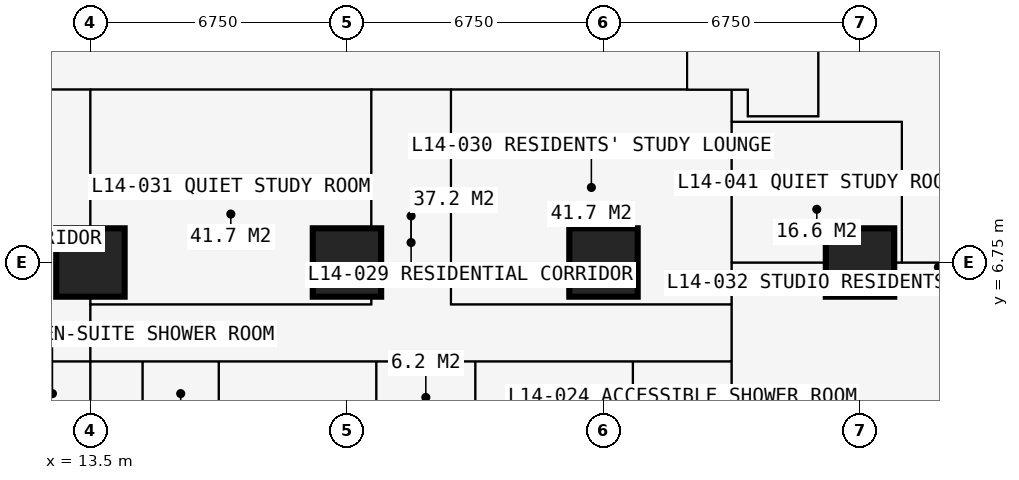
"""IFC4 building model, lengths in metres.
Left out: names, types, materials, properties, quantities, classifications, styles, units other than length and angle.
Written with IfcOpenShell. Run it as: python <this file> out.ifc"""

import sys

from ifc_helpers import new_model, si_unit, direction, frame, frame_2d, origin, origin_2d, place, context, subcontext, project, spatial, rectangle, extrude, element, fill, save


model = new_model("IFC4")
c1 = context("Model", 3, precision=1e-05, world=origin(), true_north=direction((0.0, 1.0)))
c2 = subcontext(c1, "Body", "Model", "MODEL_VIEW")
j1 = project(units=[si_unit("LENGTHUNIT", "METRE"), si_unit("PLANEANGLEUNIT", "RADIAN")], contexts=[c1])
p1 = place(None, origin())
s1 = spatial("IfcSite", under=j1, at=p1, CompositionType="ELEMENT")
p2 = place(p1, origin())
s2 = spatial("IfcBuilding", under=s1, at=p2, CompositionType="ELEMENT")
p3 = place(p2, frame((0.0, 0.0, 54.0)))
s3 = spatial("IfcBuildingStorey", under=s2, at=p3, CompositionType="ELEMENT", Elevation=54.0)
for number, where, z_axis, x_axis in (
    (1, (13.5, 6.75, 0.0), (0.0, 0.0, 1.0), (1.0, 0.0, 0.0)),
    (2, (20.25, 6.75, 0.0), (0.0, 0.0, 1.0), (1.0, 0.0, 0.0)),
    (3, (27.0, 6.75, 0.0), (0.0, 0.0, 1.0), (1.0, 0.0, 0.0)),
    (4, (33.75, 6.75, 0.0), (0.0, 0.0, 1.0), (1.0, 0.0, 0.0)),
):
    element("IfcColumn", number, at=place(p3, frame(where, z_axis=z_axis, x_axis=x_axis)), inside=s3, PredefinedType="COLUMN", context=c2, shape_type="SweptSolid", body=[
        extrude(rectangle(XDim=1.8, YDim=1.8, at=origin_2d()), origin(), (0.0, 0.0, 1.0), 3.6),
    ])
p4 = place(p3, frame((6.75, 4.15, 0.0), z_axis=(0.0, 0.0, 1.0), x_axis=(1.0, 0.0, 0.0)))
e5 = element("IfcWall", 5, at=p4, inside=s3, PredefinedType="PARTITIONING", context=c2, shape_type="SweptSolid", body=[
    extrude(rectangle(XDim=23.625, YDim=0.15, at=frame_2d((11.812, 0.0))), origin(), (0.0, 0.0, 1.0), 3.375),
])
p5 = place(p4, frame((0.2, 0.0, 0.0)))
e6 = element("IfcOpeningElement", 6, at=p5, cuts=e5, PredefinedType="OPENING", context=c2, shape_type="SweptSolid", body=[
    extrude(rectangle(XDim=0.95, YDim=2.2, at=frame_2d((0.475, 1.1))), frame((0.0, 0.085, 0.0), z_axis=(0.0, -1.0, 0.0), x_axis=(1.0, 0.0, 0.0)), (0.0, 0.0, 1.0), 0.17),
])
p6 = place(p4, frame((3.625, 0.0, 0.0)))
e7 = element("IfcOpeningElement", 7, at=p6, cuts=e5, PredefinedType="OPENING", context=c2, shape_type="SweptSolid", body=[
    extrude(rectangle(XDim=0.95, YDim=2.2, at=frame_2d((0.475, 1.1))), frame((0.0, 0.085, 0.0), z_axis=(0.0, -1.0, 0.0), x_axis=(1.0, 0.0, 0.0)), (0.0, 0.0, 1.0), 0.17),
])
p7 = place(p4, frame((18.475, 0.0, 0.0)))
e8 = element("IfcOpeningElement", 8, at=p7, cuts=e5, PredefinedType="OPENING", context=c2, shape_type="SweptSolid", body=[
    extrude(rectangle(XDim=0.95, YDim=2.2, at=frame_2d((0.475, 1.1))), frame((0.0, 0.085, 0.0), z_axis=(0.0, -1.0, 0.0), x_axis=(1.0, 0.0, 0.0)), (0.0, 0.0, 1.0), 0.17),
])
p8 = place(p4, frame((11.725, 0.0, 0.0)))
e9 = element("IfcOpeningElement", 9, at=p8, cuts=e5, PredefinedType="OPENING", context=c2, shape_type="SweptSolid", body=[
    extrude(rectangle(XDim=0.95, YDim=2.2, at=frame_2d((0.475, 1.1))), frame((0.0, 0.085, 0.0), z_axis=(0.0, -1.0, 0.0), x_axis=(1.0, 0.0, 0.0)), (0.0, 0.0, 1.0), 0.17),
])
p9 = place(p4, frame((6.95, 0.0, 0.0)))
e10 = element("IfcOpeningElement", 10, at=p9, cuts=e5, PredefinedType="OPENING", context=c2, shape_type="SweptSolid", body=[
    extrude(rectangle(XDim=0.95, YDim=2.2, at=frame_2d((0.475, 1.1))), frame((0.0, 0.085, 0.0), z_axis=(0.0, -1.0, 0.0), x_axis=(1.0, 0.0, 0.0)), (0.0, 0.0, 1.0), 0.17),
])
p10 = place(p3, frame((10.125, 11.3, 0.0), z_axis=(0.0, 0.0, 1.0), x_axis=(1.0, 0.0, 0.0)))
e11 = element("IfcWall", 11, at=p10, inside=s3, PredefinedType="PARTITIONING", context=c2, shape_type="SweptSolid", body=[
    extrude(rectangle(XDim=20.675, YDim=0.15, at=frame_2d((10.337, 0.0))), origin(), (0.0, 0.0, 1.0), 3.375),
])
p11 = place(p10, frame((1.775, 0.0, 0.0)))
e12 = element("IfcOpeningElement", 12, at=p11, cuts=e11, PredefinedType="OPENING", context=c2, shape_type="SweptSolid", body=[
    extrude(rectangle(XDim=1.0, YDim=2.2, at=frame_2d((0.5, 1.1))), frame((0.0, 0.085, 0.0), z_axis=(0.0, -1.0, 0.0), x_axis=(1.0, 0.0, 0.0)), (0.0, 0.0, 1.0), 0.17),
])
p12 = place(p10, frame((11.312, 0.0, 0.0)))
e13 = element("IfcOpeningElement", 13, at=p12, cuts=e11, PredefinedType="OPENING", context=c2, shape_type="SweptSolid", body=[
    extrude(rectangle(XDim=1.0, YDim=2.2, at=frame_2d((0.5, 1.1))), frame((0.0, 0.085, 0.0), z_axis=(0.0, -1.0, 0.0), x_axis=(1.0, 0.0, 0.0)), (0.0, 0.0, 1.0), 0.17),
])
p13 = place(p3, frame((13.5, -0.734, 0.0), z_axis=(0.0, 0.0, 1.0), x_axis=(0.0, 1.0, 0.0)))
e14 = element("IfcWall", 14, at=p13, inside=s3, PredefinedType="PARTITIONING", context=c2, shape_type="SweptSolid", body=[
    extrude(rectangle(XDim=12.034, YDim=0.15, at=frame_2d((6.017, 0.0))), origin(), (0.0, 0.0, 1.0), 2.877),
])
p14 = place(p3, frame((13.5, 5.65, 0.0), z_axis=(0.0, 0.0, 1.0), x_axis=(1.0, 0.0, 0.0)))
e15 = element("IfcWall", 15, at=p14, inside=s3, PredefinedType="PARTITIONING", context=c2, shape_type="SweptSolid", body=[
    extrude(rectangle(XDim=7.387, YDim=0.15, at=frame_2d((3.694, 0.0))), origin(), (0.0, 0.0, 1.0), 3.375),
])
p15 = place(p14, frame((3.2, 0.0, 0.0)))
e16 = element("IfcOpeningElement", 16, at=p15, cuts=e15, PredefinedType="OPENING", context=c2, shape_type="SweptSolid", body=[
    extrude(rectangle(XDim=0.95, YDim=2.2, at=frame_2d((0.475, 1.1))), frame((0.0, 0.085, 0.0), z_axis=(0.0, -1.0, 0.0), x_axis=(1.0, 0.0, 0.0)), (0.0, 0.0, 1.0), 0.17),
])
p16 = place(p3, frame((14.875, 1.95, 0.0), z_axis=(0.0, 0.0, 1.0), x_axis=(0.0, 1.0, 0.0)))
e17 = element("IfcWall", 17, at=p16, inside=s3, PredefinedType="PARTITIONING", context=c2, shape_type="SweptSolid", body=[
    extrude(rectangle(XDim=2.2, YDim=0.1, at=frame_2d((1.1, 0.0))), origin(), (0.0, 0.0, 1.0), 3.375),
])
p17 = place(p3, frame((16.875, -0.734, 0.0), z_axis=(0.0, 0.0, 1.0), x_axis=(0.0, 1.0, 0.0)))
e18 = element("IfcWall", 18, at=p17, inside=s3, PredefinedType="PARTITIONING", context=c2, shape_type="SweptSolid", body=[
    extrude(rectangle(XDim=4.884, YDim=0.175, at=frame_2d((2.442, 0.0))), origin(), (0.0, 0.0, 1.0), 3.375),
])
p18 = place(p17, frame((3.334, 0.0, 0.0)))
e19 = element("IfcOpeningElement", 19, at=p18, cuts=e18, PredefinedType="OPENING", context=c2, shape_type="SweptSolid", body=[
    extrude(rectangle(XDim=0.9, YDim=2.2, at=frame_2d((0.45, 1.1))), frame((0.0, 0.097, 0.0), z_axis=(0.0, -1.0, 0.0), x_axis=(1.0, 0.0, 0.0)), (0.0, 0.0, 1.0), 0.195),
])
p19 = place(p3, frame((20.887, 5.65, 0.0), z_axis=(0.0, 0.0, 1.0), x_axis=(0.0, 1.0, 0.0)))
e20 = element("IfcWall", 20, at=p19, inside=s3, PredefinedType="PARTITIONING", context=c2, shape_type="SweptSolid", body=[
    extrude(rectangle(XDim=5.65, YDim=0.15, at=frame_2d((2.825, 0.0))), origin(), (0.0, 0.0, 1.0), 3.375),
])
p20 = place(p3, frame((21.025, 1.75, 0.0), z_axis=(0.0, 0.0, 1.0), x_axis=(0.0, 1.0, 0.0)))
e21 = element("IfcWall", 21, at=p20, inside=s3, PredefinedType="PARTITIONING", context=c2, shape_type="SweptSolid", body=[
    extrude(rectangle(XDim=2.4, YDim=0.1, at=frame_2d((1.2, 0.0))), origin(), (0.0, 0.0, 1.0), 3.375),
])
p21 = place(p3, frame((22.988, 5.65, 0.0), z_axis=(0.0, 0.0, 1.0), x_axis=(1.0, 0.0, 0.0)))
e22 = element("IfcWall", 22, at=p21, inside=s3, PredefinedType="PARTITIONING", context=c2, shape_type="SweptSolid", body=[
    extrude(rectangle(XDim=7.387, YDim=0.15, at=frame_2d((3.694, 0.0))), origin(), (0.0, 0.0, 1.0), 3.375),
])
p22 = place(p21, frame((2.15, 0.0, 0.0)))
e23 = element("IfcOpeningElement", 23, at=p22, cuts=e22, PredefinedType="OPENING", context=c2, shape_type="SweptSolid", body=[
    extrude(rectangle(XDim=0.95, YDim=2.2, at=frame_2d((0.475, 1.1))), frame((0.0, 0.085, 0.0), z_axis=(0.0, -1.0, 0.0), x_axis=(1.0, 0.0, 0.0)), (0.0, 0.0, 1.0), 0.17),
])
p23 = place(p3, frame((22.988, 5.65, 0.0), z_axis=(0.0, 0.0, 1.0), x_axis=(0.0, 1.0, 0.0)))
e24 = element("IfcWall", 24, at=p23, inside=s3, PredefinedType="PARTITIONING", context=c2, shape_type="SweptSolid", body=[
    extrude(rectangle(XDim=5.65, YDim=0.15, at=frame_2d((2.825, 0.0))), origin(), (0.0, 0.0, 1.0), 3.375),
])
p24 = place(p3, frame((23.625, -0.734, 0.0), z_axis=(0.0, 0.0, 1.0), x_axis=(0.0, 1.0, 0.0)))
e25 = element("IfcWall", 25, at=p24, inside=s3, PredefinedType="PARTITIONING", context=c2, shape_type="SweptSolid", body=[
    extrude(rectangle(XDim=4.884, YDim=0.175, at=frame_2d((2.442, 0.0))), origin(), (0.0, 0.0, 1.0), 3.375),
])
p25 = place(p24, frame((3.234, 0.0, 0.0)))
e26 = element("IfcOpeningElement", 26, at=p25, cuts=e25, PredefinedType="OPENING", context=c2, shape_type="SweptSolid", body=[
    extrude(rectangle(XDim=0.9, YDim=2.2, at=frame_2d((0.45, 1.1))), frame((0.0, 0.097, 0.0), z_axis=(0.0, -1.0, 0.0), x_axis=(1.0, 0.0, 0.0)), (0.0, 0.0, 1.0), 0.195),
])
p26 = place(p3, frame((27.775, 1.75, 0.0), z_axis=(0.0, 0.0, 1.0), x_axis=(0.0, 1.0, 0.0)))
e27 = element("IfcWall", 27, at=p26, inside=s3, PredefinedType="PARTITIONING", context=c2, shape_type="SweptSolid", body=[
    extrude(rectangle(XDim=2.4, YDim=0.1, at=frame_2d((1.2, 0.0))), origin(), (0.0, 0.0, 1.0), 3.375),
])
p27 = place(p3, frame((29.2, 11.3, 0.0), z_axis=(0.0, 0.0, 1.0), x_axis=(0.0, 1.0, 0.0)))
e28 = element("IfcWall", 28, at=p27, inside=s3, PredefinedType="PARTITIONING", context=c2, shape_type="SweptSolid", body=[
    extrude(rectangle(XDim=17.9, YDim=0.2, at=frame_2d((8.95, 0.0))), origin(), (0.0, 0.0, 1.0), 3.375),
])
p28 = place(p27, frame((8.35, 0.0, 0.0)))
e29 = element("IfcOpeningElement", 29, at=p28, cuts=e28, PredefinedType="OPENING", context=c2, shape_type="SweptSolid", body=[
    extrude(rectangle(XDim=1.2, YDim=2.2, at=frame_2d((0.6, 1.1))), frame((0.0, 0.11, 0.0), z_axis=(0.0, -1.0, 0.0), x_axis=(1.0, 0.0, 0.0)), (0.0, 0.0, 1.0), 0.22),
])
p29 = place(p3, frame((30.375, -0.734, 0.0), z_axis=(0.0, 0.0, 1.0), x_axis=(0.0, 1.0, 0.0)))
e30 = element("IfcWall", 30, at=p29, inside=s3, PredefinedType="PARTITIONING", context=c2, shape_type="SweptSolid", body=[
    extrude(rectangle(XDim=12.034, YDim=0.15, at=frame_2d((6.017, 0.0))), origin(), (0.0, 0.0, 1.0), 3.375),
])
p30 = place(p29, frame((5.134, 0.0, 0.0)))
e31 = element("IfcOpeningElement", 31, at=p30, cuts=e30, PredefinedType="OPENING", context=c2, shape_type="SweptSolid", body=[
    extrude(rectangle(XDim=1.0, YDim=2.2, at=frame_2d((0.5, 1.1))), frame((0.0, 0.085, 0.0), z_axis=(0.0, -1.0, 0.0), x_axis=(1.0, 0.0, 0.0)), (0.0, 0.0, 1.0), 0.17),
])
p31 = place(p3, frame((30.375, 6.75, 0.0), z_axis=(0.0, 0.0, 1.0), x_axis=(1.0, 0.0, 0.0)))
e32 = element("IfcWall", 32, at=p31, inside=s3, PredefinedType="PARTITIONING", context=c2, shape_type="SweptSolid", body=[
    extrude(rectangle(XDim=5.975, YDim=0.15, at=frame_2d((2.988, 0.0))), origin(), (0.0, 0.0, 1.0), 2.877),
])
p32 = place(p3, frame((30.375, 10.45, 0.0), z_axis=(0.0, 0.0, 1.0), x_axis=(1.0, 0.0, 0.0)))
e33 = element("IfcWall", 33, at=p32, inside=s3, PredefinedType="PARTITIONING", context=c2, shape_type="SweptSolid", body=[
    extrude(rectangle(XDim=4.475, YDim=0.15, at=frame_2d((2.238, 0.0))), origin(), (0.0, 0.0, 1.0), 3.375),
])
p33 = place(p32, frame((2.35, 0.0, 0.0)))
e34 = element("IfcOpeningElement", 34, at=p33, cuts=e33, PredefinedType="OPENING", context=c2, shape_type="SweptSolid", body=[
    extrude(rectangle(XDim=0.95, YDim=2.2, at=frame_2d((0.475, 1.1))), frame((0.0, 0.085, 0.0), z_axis=(0.0, -1.0, 0.0), x_axis=(1.0, 0.0, 0.0)), (0.0, 0.0, 1.0), 0.17),
])
p34 = place(p3, frame((30.8, 10.6, 0.0), z_axis=(0.0, 0.0, 1.0), x_axis=(0.0, 1.0, 0.0)))
e35 = element("IfcWall", 35, at=p34, inside=s3, PredefinedType="PARTITIONING", context=c2, shape_type="SweptSolid", body=[
    extrude(rectangle(XDim=0.7, YDim=0.15, at=frame_2d((0.35, 0.0))), origin(), (0.0, 0.0, 1.0), 3.375),
])
p35 = place(p3, frame((30.8, 10.6, 0.0), z_axis=(0.0, 0.0, 1.0), x_axis=(1.0, 0.0, 0.0)))
e36 = element("IfcWall", 36, at=p35, inside=s3, PredefinedType="PARTITIONING", context=c2, shape_type="SweptSolid", body=[
    extrude(rectangle(XDim=1.85, YDim=0.15, at=frame_2d((0.925, 0.0))), origin(), (0.0, 0.0, 1.0), 3.375),
])
p36 = place(p3, frame((32.65, 10.6, 0.0), z_axis=(0.0, 0.0, 1.0), x_axis=(0.0, 1.0, 0.0)))
e37 = element("IfcWall", 37, at=p36, inside=s3, PredefinedType="SHEAR", context=c2, shape_type="SweptSolid", body=[
    extrude(rectangle(XDim=9.3, YDim=0.1, at=frame_2d((4.65, 0.0))), origin(), (0.0, 0.0, 1.0), 3.375),
])
p37 = place(p36, frame((0.5, 0.0, 0.0)))
e38 = element("IfcOpeningElement", 38, at=p37, cuts=e37, PredefinedType="OPENING", context=c2, shape_type="SweptSolid", body=[
    extrude(rectangle(XDim=1.0, YDim=2.2, at=frame_2d((0.5, 1.1))), frame((0.0, 0.06, 0.0), z_axis=(0.0, -1.0, 0.0), x_axis=(1.0, 0.0, 0.0)), (0.0, 0.0, 1.0), 0.12),
])
p38 = place(p3, frame((34.85, 6.75, 0.0), z_axis=(0.0, 0.0, 1.0), x_axis=(0.0, 1.0, 0.0)))
e39 = element("IfcWall", 39, at=p38, inside=s3, PredefinedType="PARTITIONING", context=c2, shape_type="SweptSolid", body=[
    extrude(rectangle(XDim=3.7, YDim=0.15, at=frame_2d((1.85, 0.0))), origin(), (0.0, 0.0, 1.0), 3.375),
])
p39 = place(p11, origin())
e40 = element("IfcDoor", 40, at=p39, inside=s3, OperationType="SINGLE_SWING_LEFT", PredefinedType="DOOR", context=c2, shape_type="SweptSolid", body=[
    extrude(rectangle(XDim=1.0, YDim=2.2, at=frame_2d((0.5, 1.1))), frame((0.0, 0.025, 0.0), z_axis=(0.0, -1.0, 0.0), x_axis=(1.0, 0.0, 0.0)), (0.0, 0.0, 1.0), 0.05),
])
fill(e12, e40)
p40 = place(p7, origin())
e41 = element("IfcDoor", 41, at=p40, inside=s3, OperationType="SINGLE_SWING_LEFT", PredefinedType="DOOR", context=c2, shape_type="SweptSolid", body=[
    extrude(rectangle(XDim=0.95, YDim=2.2, at=frame_2d((0.475, 1.1))), frame((0.0, 0.025, 0.0), z_axis=(0.0, -1.0, 0.0), x_axis=(1.0, 0.0, 0.0)), (0.0, 0.0, 1.0), 0.05),
])
fill(e8, e41)
p41 = place(p8, origin())
e42 = element("IfcDoor", 42, at=p41, inside=s3, OperationType="SINGLE_SWING_LEFT", PredefinedType="DOOR", context=c2, shape_type="SweptSolid", body=[
    extrude(rectangle(XDim=0.95, YDim=2.2, at=frame_2d((0.475, 1.1))), frame((0.0, 0.025, 0.0), z_axis=(0.0, -1.0, 0.0), x_axis=(1.0, 0.0, 0.0)), (0.0, 0.0, 1.0), 0.05),
])
fill(e9, e42)
p42 = place(p25, origin())
e43 = element("IfcDoor", 43, at=p42, inside=s3, OperationType="SINGLE_SWING_RIGHT", PredefinedType="DOOR", context=c2, shape_type="SweptSolid", body=[
    extrude(rectangle(XDim=0.9, YDim=2.2, at=frame_2d((0.45, 1.1))), frame((0.0, 0.025, 0.0), z_axis=(0.0, -1.0, 0.0), x_axis=(1.0, 0.0, 0.0)), (0.0, 0.0, 1.0), 0.05),
])
fill(e26, e43)
p43 = place(p9, origin())
e44 = element("IfcDoor", 44, at=p43, inside=s3, OperationType="SINGLE_SWING_LEFT", PredefinedType="DOOR", context=c2, shape_type="SweptSolid", body=[
    extrude(rectangle(XDim=0.95, YDim=2.2, at=frame_2d((0.475, 1.1))), frame((0.0, 0.025, 0.0), z_axis=(0.0, -1.0, 0.0), x_axis=(1.0, 0.0, 0.0)), (0.0, 0.0, 1.0), 0.05),
])
fill(e10, e44)
p44 = place(p18, origin())
e45 = element("IfcDoor", 45, at=p44, inside=s3, OperationType="SINGLE_SWING_RIGHT", PredefinedType="DOOR", context=c2, shape_type="SweptSolid", body=[
    extrude(rectangle(XDim=0.9, YDim=2.2, at=frame_2d((0.45, 1.1))), frame((0.0, 0.025, 0.0), z_axis=(0.0, -1.0, 0.0), x_axis=(1.0, 0.0, 0.0)), (0.0, 0.0, 1.0), 0.05),
])
fill(e19, e45)
p45 = place(p12, origin())
e46 = element("IfcDoor", 46, at=p45, inside=s3, OperationType="SINGLE_SWING_LEFT", PredefinedType="DOOR", context=c2, shape_type="SweptSolid", body=[
    extrude(rectangle(XDim=1.0, YDim=2.2, at=frame_2d((0.5, 1.1))), frame((0.0, 0.025, 0.0), z_axis=(0.0, -1.0, 0.0), x_axis=(1.0, 0.0, 0.0)), (0.0, 0.0, 1.0), 0.05),
])
fill(e13, e46)
p46 = place(p22, origin())
e47 = element("IfcDoor", 47, at=p46, inside=s3, OperationType="SINGLE_SWING_LEFT", PredefinedType="DOOR", context=c2, shape_type="SweptSolid", body=[
    extrude(rectangle(XDim=0.95, YDim=2.2, at=frame_2d((0.475, 1.1))), frame((0.0, 0.025, 0.0), z_axis=(0.0, -1.0, 0.0), x_axis=(1.0, 0.0, 0.0)), (0.0, 0.0, 1.0), 0.05),
])
fill(e23, e47)
p47 = place(p15, origin())
e48 = element("IfcDoor", 48, at=p47, inside=s3, OperationType="SINGLE_SWING_LEFT", PredefinedType="DOOR", context=c2, shape_type="SweptSolid", body=[
    extrude(rectangle(XDim=0.95, YDim=2.2, at=frame_2d((0.475, 1.1))), frame((0.0, 0.025, 0.0), z_axis=(0.0, -1.0, 0.0), x_axis=(1.0, 0.0, 0.0)), (0.0, 0.0, 1.0), 0.05),
])
fill(e16, e48)
p48 = place(p30, origin())
e49 = element("IfcDoor", 49, at=p48, inside=s3, OperationType="SINGLE_SWING_LEFT", PredefinedType="DOOR", context=c2, shape_type="SweptSolid", body=[
    extrude(rectangle(XDim=1.0, YDim=2.2, at=frame_2d((0.5, 1.1))), frame((0.0, 0.025, 0.0), z_axis=(0.0, -1.0, 0.0), x_axis=(1.0, 0.0, 0.0)), (0.0, 0.0, 1.0), 0.05),
])
fill(e31, e49)
p49 = place(p37, origin())
e50 = element("IfcDoor", 50, at=p49, inside=s3, OperationType="SINGLE_SWING_LEFT", PredefinedType="DOOR", context=c2, shape_type="SweptSolid", body=[
    extrude(rectangle(XDim=1.0, YDim=2.2, at=frame_2d((0.5, 1.1))), frame((0.0, 0.025, 0.0), z_axis=(0.0, -1.0, 0.0), x_axis=(1.0, 0.0, 0.0)), (0.0, 0.0, 1.0), 0.05),
])
fill(e38, e50)
p50 = place(p33, origin())
e51 = element("IfcDoor", 51, at=p50, inside=s3, OperationType="SINGLE_SWING_LEFT", PredefinedType="DOOR", context=c2, shape_type="SweptSolid", body=[
    extrude(rectangle(XDim=0.95, YDim=2.2, at=frame_2d((0.475, 1.1))), frame((0.0, 0.025, 0.0), z_axis=(0.0, -1.0, 0.0), x_axis=(1.0, 0.0, 0.0)), (0.0, 0.0, 1.0), 0.05),
])
fill(e34, e51)
save(model, sys.argv[1])
